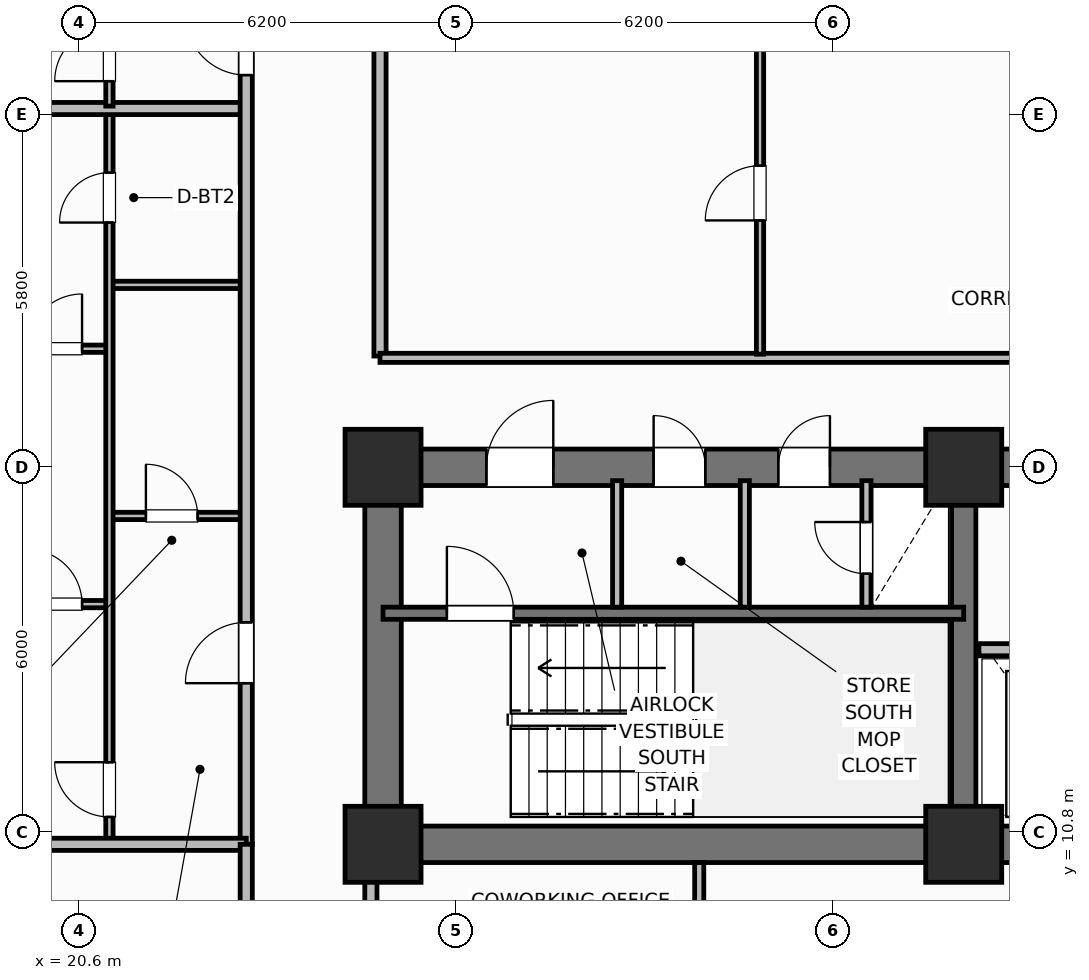
"""IFC4 building model, lengths in metres.
Left out: names, types, materials, properties, quantities, classifications, styles, units other than length and angle.
Written with IfcOpenShell. Run it as: python <this file> out.ifc"""

import sys

from ifc_helpers import new_model, si_unit, direction, frame, frame_2d, origin, origin_2d, place, context, subcontext, project, spatial, rectangle, extrude, element, fill, save


model = new_model("IFC4")
c1 = context("Model", 3, precision=1e-05, world=origin(), true_north=direction((0.0, 1.0)))
c2 = subcontext(c1, "Body", "Model", "MODEL_VIEW")
j1 = project(units=[si_unit("LENGTHUNIT", "METRE"), si_unit("PLANEANGLEUNIT", "RADIAN")], contexts=[c1])
p1 = place(None, origin())
s1 = spatial("IfcSite", under=j1, at=p1, CompositionType="ELEMENT")
p2 = place(p1, origin())
s2 = spatial("IfcBuilding", under=s1, at=p2, CompositionType="ELEMENT")
p3 = place(p2, frame((0.0, 0.0, 43.6)))
s3 = spatial("IfcBuildingStorey", under=s2, at=p3, CompositionType="ELEMENT", Elevation=43.6)
p4 = place(p3, frame((52.8, 10.6, 0.0), z_axis=(0.0, 0.0, 1.0), x_axis=(-1.0, 0.0, 0.0)))
e1 = element("IfcWall", 1, at=p4, inside=s3, PredefinedType="SHEAR", context=c2, shape_type="SweptSolid", body=[
    extrude(rectangle(XDim=27.2, YDim=0.6, at=frame_2d((13.6, 0.0))), origin(), (0.0, 0.0, 1.0), 3.7),
])
p5 = place(p3, frame((25.6, 10.9, 0.0), z_axis=(0.0, 0.0, 1.0), x_axis=(0.0, 1.0, 0.0)))
e2 = element("IfcWall", 2, at=p5, inside=s3, PredefinedType="SHEAR", context=c2, shape_type="SweptSolid", body=[
    extrude(rectangle(XDim=5.6, YDim=0.6, at=frame_2d((2.8, 0.0))), origin(), (0.0, 0.0, 1.0), 3.7),
])
p6 = place(p3, frame((25.6, 16.8, 0.0), z_axis=(0.0, 0.0, 1.0), x_axis=(1.0, 0.0, 0.0)))
e3 = element("IfcWall", 3, at=p6, inside=s3, PredefinedType="SHEAR", context=c2, shape_type="SweptSolid", body=[
    extrude(rectangle(XDim=27.2, YDim=0.6, at=frame_2d((13.6, 0.0))), origin(), (0.0, 0.0, 1.0), 3.7),
])
p7 = place(p6, frame((1.7, 0.0, 0.0)))
e4 = element("IfcOpeningElement", 4, at=p7, cuts=e3, PredefinedType="OPENING", context=c2, shape_type="SweptSolid", body=[
    extrude(rectangle(XDim=1.1, YDim=2.15, at=frame_2d((0.55, 1.075))), frame((0.0, 0.31, 0.0), z_axis=(0.0, -1.0, 0.0), x_axis=(1.0, 0.0, 0.0)), (0.0, 0.0, 1.0), 0.62),
])
p8 = place(p6, frame((4.45, 0.0, 0.0)))
e5 = element("IfcOpeningElement", 5, at=p8, cuts=e3, PredefinedType="OPENING", context=c2, shape_type="SweptSolid", body=[
    extrude(rectangle(XDim=0.85, YDim=2.1, at=frame_2d((0.425, 1.05))), frame((0.0, 0.31, 0.0), z_axis=(0.0, -1.0, 0.0), x_axis=(1.0, 0.0, 0.0)), (0.0, 0.0, 1.0), 0.62),
])
p9 = place(p6, frame((6.5, 0.0, 0.0)))
e6 = element("IfcOpeningElement", 6, at=p9, cuts=e3, PredefinedType="OPENING", context=c2, shape_type="SweptSolid", body=[
    extrude(rectangle(XDim=0.85, YDim=2.1, at=frame_2d((0.425, 1.05))), frame((0.0, 0.31, 0.0), z_axis=(0.0, -1.0, 0.0), x_axis=(1.0, 0.0, 0.0)), (0.0, 0.0, 1.0), 0.62),
])
p10 = place(p6, frame((13.0, 0.0, 0.0)))
e7 = element("IfcOpeningElement", 7, at=p10, cuts=e3, PredefinedType="OPENING", context=c2, shape_type="SweptSolid", body=[
    extrude(rectangle(XDim=1.2, YDim=2.15, at=frame_2d((0.6, 1.075))), frame((0.0, 0.31, 0.0), z_axis=(0.0, -1.0, 0.0), x_axis=(1.0, 0.0, 0.0)), (0.0, 0.0, 1.0), 0.62),
])
p11 = place(p6, frame((20.4, 0.0, 0.0)))
e8 = element("IfcOpeningElement", 8, at=p11, cuts=e3, PredefinedType="OPENING", context=c2, shape_type="SweptSolid", body=[
    extrude(rectangle(XDim=1.3, YDim=2.2, at=frame_2d((0.65, 1.1))), frame((0.0, 0.31, 0.0), z_axis=(0.0, -1.0, 0.0), x_axis=(1.0, 0.0, 0.0)), (0.0, 0.0, 1.0), 0.62),
])
p12 = place(p6, frame((24.65, 0.0, 0.0)))
e9 = element("IfcOpeningElement", 9, at=p12, cuts=e3, PredefinedType="OPENING", context=c2, shape_type="SweptSolid", body=[
    extrude(rectangle(XDim=0.85, YDim=2.1, at=frame_2d((0.425, 1.05))), frame((0.0, 0.31, 0.0), z_axis=(0.0, -1.0, 0.0), x_axis=(1.0, 0.0, 0.0)), (0.0, 0.0, 1.0), 0.62),
])
p13 = place(p3, frame((35.15, 10.9, 0.0), z_axis=(0.0, 0.0, 1.0), x_axis=(0.0, 1.0, 0.0)))
e10 = element("IfcWall", 10, at=p13, inside=s3, PredefinedType="SHEAR", context=c2, shape_type="SweptSolid", body=[
    extrude(rectangle(XDim=5.6, YDim=0.4, at=frame_2d((2.8, 0.0))), origin(), (0.0, 0.0, 1.0), 3.7),
])
for number, where, z_axis, x_axis in (
    (11, (25.6, 10.6, 0.0), (0.0, 0.0, 1.0), (1.0, 0.0, 0.0)),
    (12, (25.6, 16.8, 0.0), (0.0, 0.0, 1.0), (1.0, 0.0, 0.0)),
    (13, (35.15, 10.6, 0.0), (0.0, 0.0, 1.0), (1.0, 0.0, 0.0)),
    (14, (35.15, 16.8, 0.0), (0.0, 0.0, 1.0), (1.0, 0.0, 0.0)),
):
    element("IfcColumn", number, at=place(p3, frame(where, z_axis=z_axis, x_axis=x_axis)), inside=s3, PredefinedType="COLUMN", context=c2, shape_type="SweptSolid", body=[
        extrude(rectangle(XDim=1.25, YDim=1.25, at=origin_2d()), origin(), (0.0, 0.0, 1.0), 3.7),
    ])
p14 = place(p3, frame((25.6, 14.4, 0.0), z_axis=(0.0, 0.0, 1.0), x_axis=(1.0, 0.0, 0.0)))
e15 = element("IfcWall", 15, at=p14, inside=s3, PredefinedType="SHEAR", context=c2, shape_type="SweptSolid", body=[
    extrude(rectangle(XDim=9.55, YDim=0.2, at=frame_2d((4.775, 0.0))), origin(), (0.0, 0.0, 1.0), 3.7),
])
p15 = place(p14, frame((1.05, 0.0, 0.0)))
e16 = element("IfcOpeningElement", 16, at=p15, cuts=e15, PredefinedType="OPENING", context=c2, shape_type="SweptSolid", body=[
    extrude(rectangle(XDim=1.1, YDim=2.15, at=frame_2d((0.55, 1.075))), frame((0.0, 0.11, 0.0), z_axis=(0.0, -1.0, 0.0), x_axis=(1.0, 0.0, 0.0)), (0.0, 0.0, 1.0), 0.22),
])
for number, where, z_axis, x_axis in (
    (17, (29.45, 14.5, 0.0), (0.0, 0.0, 1.0), (0.0, 1.0, 0.0)),
    (18, (31.55, 14.5, 0.0), (0.0, 0.0, 1.0), (0.0, 1.0, 0.0)),
):
    element("IfcWall", number, at=place(p3, frame(where, z_axis=z_axis, x_axis=x_axis)), inside=s3, PredefinedType="PARTITIONING", context=c2, shape_type="SweptSolid", body=[
        extrude(rectangle(XDim=2.08, YDim=0.15, at=frame_2d((1.04, 0.0))), origin(), (0.0, 0.0, 1.0), 2.53),
    ])
p16 = place(p3, frame((33.55, 14.5, 0.0), z_axis=(0.0, 0.0, 1.0), x_axis=(0.0, 1.0, 0.0)))
e19 = element("IfcWall", 19, at=p16, inside=s3, PredefinedType="PARTITIONING", context=c2, shape_type="SweptSolid", body=[
    extrude(rectangle(XDim=2.08, YDim=0.15, at=frame_2d((1.04, 0.0))), origin(), (0.0, 0.0, 1.0), 2.53),
])
p17 = place(p16, frame((0.55, 0.0, 0.0)))
e20 = element("IfcOpeningElement", 20, at=p17, cuts=e19, PredefinedType="OPENING", context=c2, shape_type="SweptSolid", body=[
    extrude(rectangle(XDim=0.85, YDim=2.05, at=frame_2d((0.425, 1.025))), frame((0.0, 0.085, 0.0), z_axis=(0.0, -1.0, 0.0), x_axis=(1.0, 0.0, 0.0)), (0.0, 0.0, 1.0), 0.17),
])
p18 = place(p3, frame((35.4, 13.8, 0.0), z_axis=(0.0, 0.0, 1.0), x_axis=(1.0, 0.0, 0.0)))
e21 = element("IfcWall", 21, at=p18, inside=s3, PredefinedType="PARTITIONING", context=c2, shape_type="SweptSolid", body=[
    extrude(rectangle(XDim=7.6, YDim=0.2, at=frame_2d((3.8, 0.0))), origin(), (0.0, 0.0, 1.0), 2.3),
])
p19 = place(p18, frame((0.7, 0.0, 0.0)))
e22 = element("IfcOpeningElement", 22, at=p19, cuts=e21, PredefinedType="OPENING", context=c2, shape_type="SweptSolid", body=[
    extrude(rectangle(XDim=1.1, YDim=2.15, at=frame_2d((0.55, 1.075))), frame((0.0, 0.11, 0.0), z_axis=(0.0, -1.0, 0.0), x_axis=(1.0, 0.0, 0.0)), (0.0, 0.0, 1.0), 0.22),
])
p20 = place(p18, frame((3.35, 0.0, 0.0)))
e23 = element("IfcOpeningElement", 23, at=p20, cuts=e21, PredefinedType="OPENING", context=c2, shape_type="SweptSolid", body=[
    extrude(rectangle(XDim=1.2, YDim=2.15, at=frame_2d((0.6, 1.075))), frame((0.0, 0.11, 0.0), z_axis=(0.0, -1.0, 0.0), x_axis=(1.0, 0.0, 0.0)), (0.0, 0.0, 1.0), 0.22),
])
p21 = place(p3, frame((25.55, 18.63, 0.0), z_axis=(0.0, 0.0, 1.0), x_axis=(0.0, 1.0, 0.0)))
e24 = element("IfcWall", 24, at=p21, inside=s3, PredefinedType="PARTITIONING", context=c2, shape_type="SweptSolid", body=[
    extrude(rectangle(XDim=19.14, YDim=0.2, at=frame_2d((9.57, 0.0))), origin(), (0.0, 0.0, 1.0), 2.53),
])
p22 = place(p3, frame((25.55, 18.6, 0.0), z_axis=(0.0, 0.0, 1.0), x_axis=(1.0, 0.0, 0.0)))
e25 = element("IfcWall", 25, at=p22, inside=s3, PredefinedType="PARTITIONING", context=c2, shape_type="SweptSolid", body=[
    extrude(rectangle(XDim=14.9, YDim=0.15, at=frame_2d((7.45, 0.0))), origin(), (0.0, 0.0, 1.0), 2.53),
])
p23 = place(p3, frame((31.8, 18.66, 0.0), z_axis=(0.0, 0.0, 1.0), x_axis=(0.0, 1.0, 0.0)))
e26 = element("IfcWall", 26, at=p23, inside=s3, PredefinedType="PARTITIONING", context=c2, shape_type="SweptSolid", body=[
    extrude(rectangle(XDim=9.49, YDim=0.12, at=frame_2d((4.745, 0.0))), origin(), (0.0, 0.0, 1.0), 2.53),
])
p24 = place(p23, frame((2.2, 0.0, 0.0)))
e27 = element("IfcOpeningElement", 27, at=p24, cuts=e26, PredefinedType="OPENING", context=c2, shape_type="SweptSolid", body=[
    extrude(rectangle(XDim=0.9, YDim=2.1, at=frame_2d((0.45, 1.05))), frame((0.0, 0.07, 0.0), z_axis=(0.0, -1.0, 0.0), x_axis=(1.0, 0.0, 0.0)), (0.0, 0.0, 1.0), 0.14),
])
p25 = place(p3, frame((21.1, 16.0, 0.0), z_axis=(0.0, 0.0, 1.0), x_axis=(1.0, 0.0, 0.0)))
e28 = element("IfcWall", 28, at=p25, inside=s3, PredefinedType="PARTITIONING", context=c2, shape_type="SweptSolid", body=[
    extrude(rectangle(XDim=2.25, YDim=0.12, at=frame_2d((1.125, 0.0))), origin(), (0.0, 0.0, 1.0), 2.53),
])
p26 = place(p25, frame((0.6, 0.0, 0.0)))
e29 = element("IfcOpeningElement", 29, at=p26, cuts=e28, PredefinedType="OPENING", context=c2, shape_type="SweptSolid", body=[
    extrude(rectangle(XDim=0.85, YDim=2.1, at=frame_2d((0.425, 1.05))), frame((0.0, 0.07, 0.0), z_axis=(0.0, -1.0, 0.0), x_axis=(1.0, 0.0, 0.0)), (0.0, 0.0, 1.0), 0.14),
])
p27 = place(p3, frame((21.1, 19.8, 0.0), z_axis=(0.0, 0.0, 1.0), x_axis=(1.0, 0.0, 0.0)))
e30 = element("IfcWall", 30, at=p27, inside=s3, PredefinedType="PARTITIONING", context=c2, shape_type="SweptSolid", body=[
    extrude(rectangle(XDim=2.25, YDim=0.12, at=frame_2d((1.125, 0.0))), origin(), (0.0, 0.0, 1.0), 2.53),
])
p28 = place(p3, frame((14.57, 14.55, 0.0), z_axis=(0.0, 0.0, 1.0), x_axis=(1.0, 0.0, 0.0)))
e31 = element("IfcWall", 31, at=p28, inside=s3, PredefinedType="PARTITIONING", context=c2, shape_type="SweptSolid", body=[
    extrude(rectangle(XDim=6.53, YDim=0.12, at=frame_2d((3.265, 0.0))), origin(), (0.0, 0.0, 1.0), 2.53),
])
p29 = place(p28, frame((5.18, 0.0, 0.0)))
e32 = element("IfcOpeningElement", 32, at=p29, cuts=e31, PredefinedType="OPENING", context=c2, shape_type="SweptSolid", body=[
    extrude(rectangle(XDim=0.9, YDim=2.1, at=frame_2d((0.45, 1.05))), frame((0.0, 0.07, 0.0), z_axis=(0.0, -1.0, 0.0), x_axis=(1.0, 0.0, 0.0)), (0.0, 0.0, 1.0), 0.14),
])
p30 = place(p3, frame((14.57, 18.75, 0.0), z_axis=(0.0, 0.0, 1.0), x_axis=(1.0, 0.0, 0.0)))
e33 = element("IfcWall", 33, at=p30, inside=s3, PredefinedType="PARTITIONING", context=c2, shape_type="SweptSolid", body=[
    extrude(rectangle(XDim=6.53, YDim=0.12, at=frame_2d((3.265, 0.0))), origin(), (0.0, 0.0, 1.0), 2.53),
])
p31 = place(p30, frame((5.18, 0.0, 0.0)))
e34 = element("IfcOpeningElement", 34, at=p31, cuts=e33, PredefinedType="OPENING", context=c2, shape_type="SweptSolid", body=[
    extrude(rectangle(XDim=0.9, YDim=2.1, at=frame_2d((0.45, 1.05))), frame((0.0, 0.07, 0.0), z_axis=(0.0, -1.0, 0.0), x_axis=(1.0, 0.0, 0.0)), (0.0, 0.0, 1.0), 0.14),
])
p32 = place(p3, frame((21.1, 10.64, 0.0), z_axis=(0.0, 0.0, 1.0), x_axis=(0.0, 1.0, 0.0)))
e35 = element("IfcWall", 35, at=p32, inside=s3, PredefinedType="PARTITIONING", context=c2, shape_type="SweptSolid", body=[
    extrude(rectangle(XDim=12.02, YDim=0.12, at=frame_2d((6.01, 0.0))), origin(), (0.0, 0.0, 1.0), 2.53),
])
p33 = place(p32, frame((0.41, 0.0, 0.0)))
e36 = element("IfcOpeningElement", 36, at=p33, cuts=e35, PredefinedType="OPENING", context=c2, shape_type="SweptSolid", body=[
    extrude(rectangle(XDim=0.9, YDim=2.1, at=frame_2d((0.45, 1.05))), frame((0.0, 0.07, 0.0), z_axis=(0.0, -1.0, 0.0), x_axis=(1.0, 0.0, 0.0)), (0.0, 0.0, 1.0), 0.14),
])
p34 = place(p32, frame((10.185, 0.0, 0.0)))
e37 = element("IfcOpeningElement", 37, at=p34, cuts=e35, PredefinedType="OPENING", context=c2, shape_type="SweptSolid", body=[
    extrude(rectangle(XDim=0.82, YDim=2.08, at=frame_2d((0.41, 1.04))), frame((0.0, 0.07, 0.0), z_axis=(0.0, -1.0, 0.0), x_axis=(1.0, 0.0, 0.0)), (0.0, 0.0, 1.0), 0.14),
])
p35 = place(p3, frame((14.57, 22.7, 0.0), z_axis=(0.0, 0.0, 1.0), x_axis=(1.0, 0.0, 0.0)))
e38 = element("IfcWall", 38, at=p35, inside=s3, PredefinedType="PARTITIONING", context=c2, shape_type="SweptSolid", body=[
    extrude(rectangle(XDim=8.78, YDim=0.2, at=frame_2d((4.39, 0.0))), origin(), (0.0, 0.0, 1.0), 2.53),
])
p36 = place(p3, frame((21.1, 22.74, 0.0), z_axis=(0.0, 0.0, 1.0), x_axis=(0.0, 1.0, 0.0)))
e39 = element("IfcWall", 39, at=p36, inside=s3, PredefinedType="PARTITIONING", context=c2, shape_type="SweptSolid", body=[
    extrude(rectangle(XDim=11.404, YDim=0.12, at=frame_2d((5.702, 0.0))), origin(), (0.0, 0.0, 1.0), 2.53),
])
p37 = place(p36, frame((0.41, 0.0, 0.0)))
e40 = element("IfcOpeningElement", 40, at=p37, cuts=e39, PredefinedType="OPENING", context=c2, shape_type="SweptSolid", body=[
    extrude(rectangle(XDim=0.9, YDim=2.1, at=frame_2d((0.45, 1.05))), frame((0.0, 0.07, 0.0), z_axis=(0.0, -1.0, 0.0), x_axis=(1.0, 0.0, 0.0)), (0.0, 0.0, 1.0), 0.14),
])
p38 = place(p3, frame((23.35, 10.6, 0.0), z_axis=(0.0, 0.0, 1.0), x_axis=(0.0, 1.0, 0.0)))
e41 = element("IfcWall", 41, at=p38, inside=s3, PredefinedType="PARTITIONING", context=c2, shape_type="SweptSolid", body=[
    extrude(rectangle(XDim=35.2, YDim=0.2, at=frame_2d((17.6, 0.0))), origin(), (0.0, 0.0, 1.0), 2.53),
])
p39 = place(p38, frame((2.65, 0.0, 0.0)))
e42 = element("IfcOpeningElement", 42, at=p39, cuts=e41, PredefinedType="OPENING", context=c2, shape_type="SweptSolid", body=[
    extrude(rectangle(XDim=1.0, YDim=2.15, at=frame_2d((0.5, 1.075))), frame((0.0, 0.11, 0.0), z_axis=(0.0, -1.0, 0.0), x_axis=(1.0, 0.0, 0.0)), (0.0, 0.0, 1.0), 0.22),
])
p40 = place(p38, frame((12.65, 0.0, 0.0)))
e43 = element("IfcOpeningElement", 43, at=p40, cuts=e41, PredefinedType="OPENING", context=c2, shape_type="SweptSolid", body=[
    extrude(rectangle(XDim=1.0, YDim=2.15, at=frame_2d((0.5, 1.075))), frame((0.0, 0.11, 0.0), z_axis=(0.0, -1.0, 0.0), x_axis=(1.0, 0.0, 0.0)), (0.0, 0.0, 1.0), 0.22),
])
p41 = place(p38, frame((24.134, 0.0, 0.0)))
e44 = element("IfcOpeningElement", 44, at=p41, cuts=e41, PredefinedType="OPENING", context=c2, shape_type="SweptSolid", body=[
    extrude(rectangle(XDim=1.0, YDim=2.15, at=frame_2d((0.5, 1.075))), frame((0.0, 0.11, 0.0), z_axis=(0.0, -1.0, 0.0), x_axis=(1.0, 0.0, 0.0)), (0.0, 0.0, 1.0), 0.22),
])
p42 = place(p3, frame((14.99, 10.6, 0.0), z_axis=(0.0, 0.0, 1.0), x_axis=(1.0, 0.0, 0.0)))
e45 = element("IfcWall", 45, at=p42, inside=s3, PredefinedType="PARTITIONING", context=c2, shape_type="SweptSolid", body=[
    extrude(rectangle(XDim=8.36, YDim=0.2, at=frame_2d((4.18, 0.0))), origin(), (0.0, 0.0, 1.0), 2.53),
])
p43 = place(p3, frame((23.35, 4.97, 0.0), z_axis=(0.0, 0.0, 1.0), x_axis=(0.0, 1.0, 0.0)))
e46 = element("IfcWall", 46, at=p43, inside=s3, PredefinedType="PARTITIONING", context=c2, shape_type="SweptSolid", body=[
    extrude(rectangle(XDim=5.63, YDim=0.2, at=frame_2d((2.815, 0.0))), origin(), (0.0, 0.0, 1.0), 2.53),
])
p44 = place(p3, frame((30.8, 4.97, 0.0), z_axis=(0.0, 0.0, 1.0), x_axis=(0.0, 1.0, 0.0)))
e47 = element("IfcWall", 47, at=p44, inside=s3, PredefinedType="PARTITIONING", context=c2, shape_type="SweptSolid", body=[
    extrude(rectangle(XDim=5.33, YDim=0.15, at=frame_2d((2.665, 0.0))), origin(), (0.0, 0.0, 1.0), 2.53),
])
p45 = place(p44, frame((1.6, 0.0, 0.0)))
e48 = element("IfcOpeningElement", 48, at=p45, cuts=e47, PredefinedType="OPENING", context=c2, shape_type="SweptSolid", body=[
    extrude(rectangle(XDim=0.9, YDim=2.1, at=frame_2d((0.45, 1.05))), frame((0.0, 0.085, 0.0), z_axis=(0.0, -1.0, 0.0), x_axis=(1.0, 0.0, 0.0)), (0.0, 0.0, 1.0), 0.17),
])
p46 = place(p3, frame((25.4, 5.92, 0.0), z_axis=(0.0, 0.0, 1.0), x_axis=(0.0, 1.0, 0.0)))
e49 = element("IfcWall", 49, at=p46, inside=s3, PredefinedType="PARTITIONING", context=c2, shape_type="SweptSolid", body=[
    extrude(rectangle(XDim=4.38, YDim=0.2, at=frame_2d((2.19, 0.0))), origin(), (0.0, 0.0, 1.0), 2.53),
])
p47 = place(p46, frame((0.85, 0.0, 0.0)))
e50 = element("IfcOpeningElement", 50, at=p47, cuts=e49, PredefinedType="OPENING", context=c2, shape_type="SweptSolid", body=[
    extrude(rectangle(XDim=0.9, YDim=2.1, at=frame_2d((0.45, 1.05))), frame((0.0, 0.11, 0.0), z_axis=(0.0, -1.0, 0.0), x_axis=(1.0, 0.0, 0.0)), (0.0, 0.0, 1.0), 0.22),
])
p48 = place(p15, origin())
e51 = element("IfcDoor", 51, at=p48, inside=s3, OperationType="SINGLE_SWING_LEFT", PredefinedType="DOOR", context=c2, shape_type="SweptSolid", body=[
    extrude(rectangle(XDim=1.1, YDim=2.15, at=frame_2d((0.55, 1.075))), frame((0.0, 0.025, 0.0), z_axis=(0.0, -1.0, 0.0), x_axis=(1.0, 0.0, 0.0)), (0.0, 0.0, 1.0), 0.05),
])
fill(e16, e51)
p49 = place(p17, origin())
e52 = element("IfcDoor", 52, at=p49, inside=s3, OperationType="SINGLE_SWING_RIGHT", PredefinedType="TRAPDOOR", context=c2, shape_type="SweptSolid", body=[
    extrude(rectangle(XDim=0.85, YDim=2.05, at=frame_2d((0.425, 1.025))), frame((0.0, 0.025, 0.0), z_axis=(0.0, -1.0, 0.0), x_axis=(1.0, 0.0, 0.0)), (0.0, 0.0, 1.0), 0.05),
])
fill(e20, e52)
p50 = place(p24, origin())
e53 = element("IfcDoor", 53, at=p50, inside=s3, OperationType="SINGLE_SWING_LEFT", PredefinedType="DOOR", context=c2, shape_type="SweptSolid", body=[
    extrude(rectangle(XDim=0.9, YDim=2.1, at=frame_2d((0.45, 1.05))), frame((0.0, 0.025, 0.0), z_axis=(0.0, -1.0, 0.0), x_axis=(1.0, 0.0, 0.0)), (0.0, 0.0, 1.0), 0.05),
])
fill(e27, e53)
p51 = place(p26, origin())
e54 = element("IfcDoor", 54, at=p51, inside=s3, OperationType="SINGLE_SWING_LEFT", PredefinedType="DOOR", context=c2, shape_type="SweptSolid", body=[
    extrude(rectangle(XDim=0.85, YDim=2.1, at=frame_2d((0.425, 1.05))), frame((0.0, 0.025, 0.0), z_axis=(0.0, -1.0, 0.0), x_axis=(1.0, 0.0, 0.0)), (0.0, 0.0, 1.0), 0.05),
])
fill(e29, e54)
p52 = place(p29, origin())
e55 = element("IfcDoor", 55, at=p52, inside=s3, OperationType="SINGLE_SWING_LEFT", PredefinedType="DOOR", context=c2, shape_type="SweptSolid", body=[
    extrude(rectangle(XDim=0.9, YDim=2.1, at=frame_2d((0.45, 1.05))), frame((0.0, 0.025, 0.0), z_axis=(0.0, -1.0, 0.0), x_axis=(1.0, 0.0, 0.0)), (0.0, 0.0, 1.0), 0.05),
])
fill(e32, e55)
p53 = place(p31, origin())
e56 = element("IfcDoor", 56, at=p53, inside=s3, OperationType="SINGLE_SWING_RIGHT", PredefinedType="DOOR", context=c2, shape_type="SweptSolid", body=[
    extrude(rectangle(XDim=0.9, YDim=2.1, at=frame_2d((0.45, 1.05))), frame((0.0, 0.025, 0.0), z_axis=(0.0, -1.0, 0.0), x_axis=(1.0, 0.0, 0.0)), (0.0, 0.0, 1.0), 0.05),
])
fill(e34, e56)
p54 = place(p33, origin())
e57 = element("IfcDoor", 57, at=p54, inside=s3, OperationType="SINGLE_SWING_RIGHT", PredefinedType="DOOR", context=c2, shape_type="SweptSolid", body=[
    extrude(rectangle(XDim=0.9, YDim=2.1, at=frame_2d((0.45, 1.05))), frame((0.0, 0.025, 0.0), z_axis=(0.0, -1.0, 0.0), x_axis=(1.0, 0.0, 0.0)), (0.0, 0.0, 1.0), 0.05),
])
fill(e36, e57)
p55 = place(p34, origin())
e58 = element("IfcDoor", 58, at=p55, inside=s3, OperationType="SINGLE_SWING_LEFT", PredefinedType="DOOR", context=c2, shape_type="SweptSolid", body=[
    extrude(rectangle(XDim=0.82, YDim=2.08, at=frame_2d((0.41, 1.04))), frame((0.0, 0.025, 0.0), z_axis=(0.0, -1.0, 0.0), x_axis=(1.0, 0.0, 0.0)), (0.0, 0.0, 1.0), 0.05),
])
fill(e37, e58)
p56 = place(p37, origin())
e59 = element("IfcDoor", 59, at=p56, inside=s3, OperationType="SINGLE_SWING_LEFT", PredefinedType="DOOR", context=c2, shape_type="SweptSolid", body=[
    extrude(rectangle(XDim=0.9, YDim=2.1, at=frame_2d((0.45, 1.05))), frame((0.0, 0.025, 0.0), z_axis=(0.0, -1.0, 0.0), x_axis=(1.0, 0.0, 0.0)), (0.0, 0.0, 1.0), 0.05),
])
fill(e40, e59)
p57 = place(p39, origin())
e60 = element("IfcDoor", 60, at=p57, inside=s3, OperationType="SINGLE_SWING_LEFT", PredefinedType="DOOR", context=c2, shape_type="SweptSolid", body=[
    extrude(rectangle(XDim=1.0, YDim=2.15, at=frame_2d((0.5, 1.075))), frame((0.0, 0.025, 0.0), z_axis=(0.0, -1.0, 0.0), x_axis=(1.0, 0.0, 0.0)), (0.0, 0.0, 1.0), 0.05),
])
fill(e42, e60)
p58 = place(p40, origin())
e61 = element("IfcDoor", 61, at=p58, inside=s3, OperationType="SINGLE_SWING_RIGHT", PredefinedType="DOOR", context=c2, shape_type="SweptSolid", body=[
    extrude(rectangle(XDim=1.0, YDim=2.15, at=frame_2d((0.5, 1.075))), frame((0.0, 0.025, 0.0), z_axis=(0.0, -1.0, 0.0), x_axis=(1.0, 0.0, 0.0)), (0.0, 0.0, 1.0), 0.05),
])
fill(e43, e61)
p59 = place(p7, origin())
e62 = element("IfcDoor", 62, at=p59, inside=s3, OperationType="SINGLE_SWING_RIGHT", PredefinedType="DOOR", context=c2, shape_type="SweptSolid", body=[
    extrude(rectangle(XDim=1.1, YDim=2.15, at=frame_2d((0.55, 1.075))), frame((0.0, 0.025, 0.0), z_axis=(0.0, -1.0, 0.0), x_axis=(1.0, 0.0, 0.0)), (0.0, 0.0, 1.0), 0.05),
])
fill(e4, e62)
p60 = place(p8, origin())
e63 = element("IfcDoor", 63, at=p60, inside=s3, OperationType="SINGLE_SWING_LEFT", PredefinedType="DOOR", context=c2, shape_type="SweptSolid", body=[
    extrude(rectangle(XDim=0.85, YDim=2.1, at=frame_2d((0.425, 1.05))), frame((0.0, 0.025, 0.0), z_axis=(0.0, -1.0, 0.0), x_axis=(1.0, 0.0, 0.0)), (0.0, 0.0, 1.0), 0.05),
])
fill(e5, e63)
p61 = place(p9, origin())
e64 = element("IfcDoor", 64, at=p61, inside=s3, OperationType="SINGLE_SWING_RIGHT", PredefinedType="DOOR", context=c2, shape_type="SweptSolid", body=[
    extrude(rectangle(XDim=0.85, YDim=2.1, at=frame_2d((0.425, 1.05))), frame((0.0, 0.025, 0.0), z_axis=(0.0, -1.0, 0.0), x_axis=(1.0, 0.0, 0.0)), (0.0, 0.0, 1.0), 0.05),
])
fill(e6, e64)
save(model, sys.argv[1])
